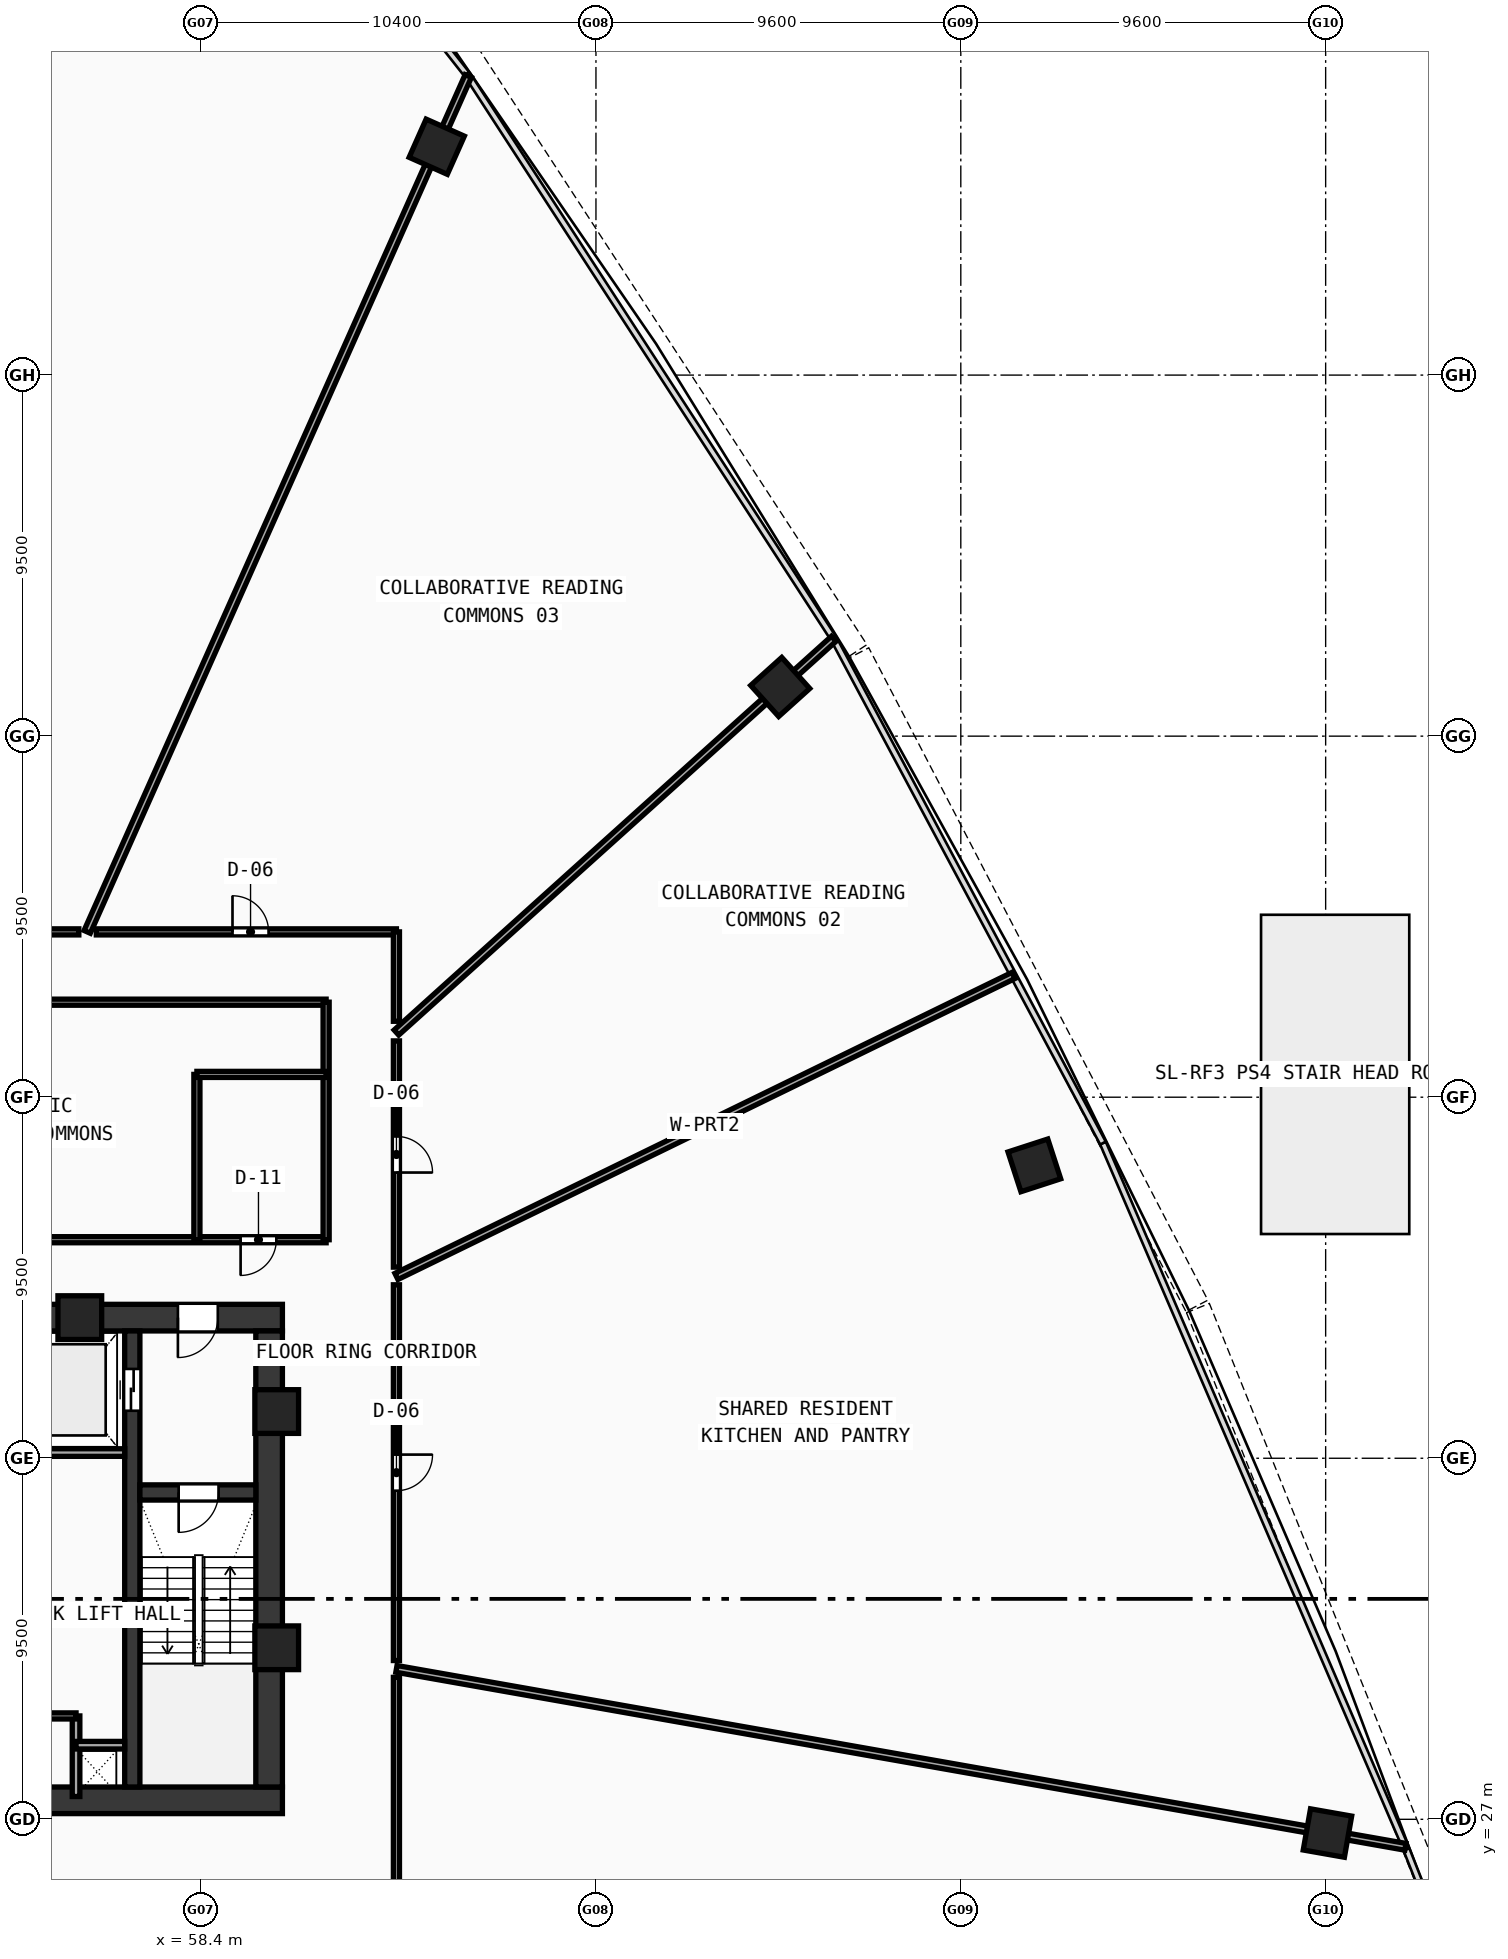
"""IFC4 building model, lengths in metres.
Left out: names, types, materials, properties, quantities, classifications, styles, units other than length and angle.
Written with IfcOpenShell. Run it as: python <this file> out.ifc"""

import sys

from ifc_helpers import new_model, si_unit, direction, frame, frame_2d, origin, origin_with_axes, origin_2d, place, context, subcontext, project, spatial, rectangle, hollow_rectangle, extrude, source, transform, mapped, element, fill, save


model = new_model("IFC4")
c1 = context("Model", 3, precision=1e-05, world=origin(), true_north=direction((0.0, 1.0)))
c2 = subcontext(c1, "Body", "Model", "MODEL_VIEW")
j1 = project(units=[si_unit("LENGTHUNIT", "METRE"), si_unit("PLANEANGLEUNIT", "RADIAN")], contexts=[c1])
p1 = place(None, origin())
s1 = spatial("IfcSite", under=j1, at=p1, CompositionType="ELEMENT")
p2 = place(p1, origin())
s2 = spatial("IfcBuilding", under=s1, at=p2, CompositionType="ELEMENT")
p3 = place(p2, frame((0.0, 0.0, 30.4)))
s3 = spatial("IfcBuildingStorey", under=s2, at=p3, CompositionType="ELEMENT", Elevation=30.4)
p4 = place(p3, frame((35.45, 27.5, 0.0), z_axis=(0.0, 0.0, 1.0), x_axis=(1.0, 0.0, 0.0)))
e1 = element("IfcWall", 1, at=p4, inside=s3, PredefinedType="SHEAR", context=c2, shape_type="SweptSolid", body=[
    extrude(rectangle(XDim=25.1, YDim=0.7, at=frame_2d((12.55, 0.0))), origin(), (0.0, 0.0, 1.0), 3.37),
])
p5 = place(p3, frame((49.2, 40.2, 0.0), z_axis=(0.0, 0.0, 1.0), x_axis=(1.0, 0.0, 0.0)))
e2 = element("IfcWall", 2, at=p5, inside=s3, PredefinedType="SHEAR", context=c2, shape_type="SweptSolid", body=[
    extrude(rectangle(XDim=11.35, YDim=0.7, at=frame_2d((5.675, 0.0))), origin(), (0.0, 0.0, 1.0), 3.37),
])
p6 = place(p5, frame((8.6, 0.0, 0.0)))
e3 = element("IfcOpeningElement", 3, at=p6, cuts=e2, PredefinedType="OPENING", context=c2, shape_type="SweptSolid", body=[
    extrude(rectangle(XDim=1.05, YDim=2.1, at=frame_2d((0.525, 1.05))), frame((0.0, 0.36, 0.0), z_axis=(0.0, -1.0, 0.0), x_axis=(1.0, 0.0, 0.0)), (0.0, 0.0, 1.0), 0.72),
])
p7 = place(p3, frame((60.2, 27.85, 0.0), z_axis=(0.0, 0.0, 1.0), x_axis=(0.0, 1.0, 0.0)))
e4 = element("IfcWall", 4, at=p7, inside=s3, PredefinedType="SHEAR", context=c2, shape_type="SweptSolid", body=[
    extrude(rectangle(XDim=12.0, YDim=0.7, at=frame_2d((6.0, 0.0))), origin(), (0.0, 0.0, 1.0), 3.37),
])
p8 = place(p3, frame((56.6, 27.85, 0.0), z_axis=(0.0, 0.0, 1.0), x_axis=(0.0, 1.0, 0.0)))
e5 = element("IfcWall", 5, at=p8, inside=s3, PredefinedType="SHEAR", context=c2, shape_type="SweptSolid", body=[
    extrude(rectangle(XDim=12.0, YDim=0.4, at=frame_2d((6.0, 0.0))), origin(), (0.0, 0.0, 1.0), 3.37),
])
p9 = place(p8, frame((9.9, 0.0, 0.0)))
e6 = element("IfcOpeningElement", 6, at=p9, cuts=e5, PredefinedType="OPENING", context=c2, shape_type="SweptSolid", body=[
    extrude(rectangle(XDim=1.1, YDim=2.1, at=frame_2d((0.55, 1.05))), frame((0.0, 0.21, 0.0), z_axis=(0.0, -1.0, 0.0), x_axis=(1.0, 0.0, 0.0)), (0.0, 0.0, 1.0), 0.42),
])
p10 = place(p3, frame((56.8, 35.6, 0.0), z_axis=(0.0, 0.0, 1.0), x_axis=(1.0, 0.0, 0.0)))
e7 = element("IfcWall", 7, at=p10, inside=s3, PredefinedType="SHEAR", context=c2, shape_type="SweptSolid", body=[
    extrude(rectangle(XDim=3.05, YDim=0.4, at=frame_2d((1.525, 0.0))), origin(), (0.0, 0.0, 1.0), 3.37),
])
p11 = place(p10, frame((1.02, 0.0, 0.0)))
e8 = element("IfcOpeningElement", 8, at=p11, cuts=e7, PredefinedType="OPENING", context=c2, shape_type="SweptSolid", body=[
    extrude(rectangle(XDim=1.05, YDim=2.1, at=frame_2d((0.525, 1.05))), frame((0.0, 0.21, 0.0), z_axis=(0.0, -1.0, 0.0), x_axis=(1.0, 0.0, 0.0)), (0.0, 0.0, 1.0), 0.42),
])
m1 = source(origin(), c2, "Body", "SweptSolid", [
    extrude(hollow_rectangle(XDim=1.15, YDim=1.15, WallThickness=0.048, at=origin_2d()), origin(), (0.0, 0.0, 1.0), 3.63),
])
for number, where, z_axis, x_axis in (
    (9, (60.4, 31.513, -0.26), (0.0, 0.0, 1.0), (1.0, 0.0, 0.0)),
    (10, (60.4, 37.729, -0.26), (0.0, 0.0, 1.0), (1.0, 0.0, 0.0)),
    (11, (55.219, 40.2, -0.26), (0.0, 0.0, 1.0), (1.0, 0.0, 0.0)),
):
    element("IfcColumn", number, at=place(p3, frame(where, z_axis=z_axis, x_axis=x_axis)), inside=s3, PredefinedType="COLUMN", context=c2, shape_type="MappedRepresentation", body=[
        mapped(m1, transform((0.0, 0.0, 0.0), scale=1.0)),
    ])
m2 = source(origin(), c2, "Body", "SweptSolid", [
    extrude(hollow_rectangle(XDim=1.1, YDim=1.1, WallThickness=0.045, at=origin_2d()), origin(), (0.0, 0.0, 1.0), 3.63),
])
for number, where, z_axis, x_axis in (
    (12, (88.048, 26.638, -0.26), (0.0, 0.0, 1.0), (0.174, 0.985, 0.0)),
    (13, (80.335, 44.206, -0.26), (0.0, 0.0, 1.0), (-0.309, 0.951, 0.0)),
    (14, (73.649, 56.794, -0.26), (0.0, 0.0, 1.0), (-0.669, 0.743, 0.0)),
    (15, (64.611, 71.009, -0.26), (0.0, 0.0, 1.0), (-0.914, 0.407, 0.0)),
):
    element("IfcColumn", number, at=place(p3, frame(where, z_axis=z_axis, x_axis=x_axis)), inside=s3, PredefinedType="COLUMN", context=c2, shape_type="MappedRepresentation", body=[
        mapped(m2, transform((0.0, 0.0, 0.0), scale=1.0)),
    ])
p12 = place(p3, frame((53.68, 36.65, 0.0), z_axis=(0.0, 0.0, 1.0), x_axis=(1.0, 0.0, 0.0)))
e16 = element("IfcWall", 16, at=p12, inside=s3, PredefinedType="SOLIDWALL", context=c2, shape_type="SweptSolid", body=[
    extrude(rectangle(XDim=2.72, YDim=0.2, at=frame_2d((1.36, 0.0))), origin(), (0.0, 0.0, 1.0), 3.37),
])
p13 = place(p3, frame((55.12, 27.6, 0.0), z_axis=(0.0, 0.0, 1.0), x_axis=(0.0, 1.0, 0.0)))
e17 = element("IfcWall", 17, at=p13, inside=s3, PredefinedType="SOLIDWALL", context=c2, shape_type="SweptSolid", body=[
    extrude(rectangle(XDim=2.12, YDim=0.2, at=frame_2d((1.06, 0.0))), origin(), (0.0, 0.0, 1.0), 3.37),
])
p14 = place(p3, frame((55.12, 28.95, 0.0), z_axis=(0.0, 0.0, 1.0), x_axis=(1.0, 0.0, 0.0)))
e18 = element("IfcWall", 18, at=p14, inside=s3, PredefinedType="SOLIDWALL", context=c2, shape_type="SweptSolid", body=[
    extrude(rectangle(XDim=1.28, YDim=0.2, at=frame_2d((0.64, 0.0))), origin(), (0.0, 0.0, 1.0), 3.37),
])
p15 = place(p3, frame((51.05, 29.72, 0.0), z_axis=(0.0, 0.0, 1.0), x_axis=(1.0, 0.0, 0.0)))
e19 = element("IfcWall", 19, at=p15, inside=s3, PredefinedType="PARTITIONING", context=c2, shape_type="SweptSolid", body=[
    extrude(rectangle(XDim=4.07, YDim=0.16, at=frame_2d((2.035, 0.0))), origin(), (0.0, 0.0, 1.0), 3.37),
])
p16 = place(p15, frame((0.5, 0.0, 0.0)))
e20 = element("IfcOpeningElement", 20, at=p16, cuts=e19, PredefinedType="OPENING", context=c2, shape_type="SweptSolid", body=[
    extrude(rectangle(XDim=0.9, YDim=2.1, at=frame_2d((0.45, 1.05))), frame((0.0, 0.09, 0.0), z_axis=(0.0, -1.0, 0.0), x_axis=(1.0, 0.0, 0.0)), (0.0, 0.0, 1.0), 0.18),
])
p17 = place(p3, frame((45.92, 42.25, 0.0), z_axis=(0.0, 0.0, 1.0), x_axis=(1.0, 0.0, 0.0)))
e21 = element("IfcWall", 21, at=p17, inside=s3, PredefinedType="PARTITIONING", context=c2, shape_type="SweptSolid", body=[
    extrude(rectangle(XDim=15.78, YDim=0.16, at=frame_2d((7.89, 0.0))), origin(), (0.0, 0.0, 1.0), 2.67),
])
p18 = place(p17, frame((2.1, 0.0, 0.0)))
e22 = element("IfcOpeningElement", 22, at=p18, cuts=e21, PredefinedType="OPENING", context=c2, shape_type="SweptSolid", body=[
    extrude(rectangle(XDim=0.92, YDim=2.1, at=frame_2d((0.46, 1.05))), frame((0.0, 0.09, 0.0), z_axis=(0.0, -1.0, 0.0), x_axis=(1.0, 0.0, 0.0)), (0.0, 0.0, 1.0), 0.18),
])
p19 = place(p17, frame((13.53, 0.0, 0.0)))
e23 = element("IfcOpeningElement", 23, at=p19, cuts=e21, PredefinedType="OPENING", context=c2, shape_type="SweptSolid", body=[
    extrude(rectangle(XDim=0.94, YDim=2.1, at=frame_2d((0.47, 1.05))), frame((0.0, 0.09, 0.0), z_axis=(0.0, -1.0, 0.0), x_axis=(1.0, 0.0, 0.0)), (0.0, 0.0, 1.0), 0.18),
])
p20 = place(p3, frame((45.92, 48.5, 0.0), z_axis=(0.0, 0.0, 1.0), x_axis=(1.0, 0.0, 0.0)))
e24 = element("IfcWall", 24, at=p20, inside=s3, PredefinedType="PARTITIONING", context=c2, shape_type="SweptSolid", body=[
    extrude(rectangle(XDim=15.78, YDim=0.16, at=frame_2d((7.89, 0.0))), origin(), (0.0, 0.0, 1.0), 2.67),
])
p21 = place(p3, frame((61.7, 42.25, 0.0), z_axis=(0.0, 0.0, 1.0), x_axis=(0.0, 1.0, 0.0)))
e25 = element("IfcWall", 25, at=p21, inside=s3, PredefinedType="PARTITIONING", context=c2, shape_type="SweptSolid", body=[
    extrude(rectangle(XDim=6.25, YDim=0.16, at=frame_2d((3.125, 0.0))), origin(), (0.0, 0.0, 1.0), 2.67),
])
p22 = place(p3, frame((58.3, 42.25, 0.0), z_axis=(0.0, 0.0, 1.0), x_axis=(0.0, 1.0, 0.0)))
e26 = element("IfcWall", 26, at=p22, inside=s3, PredefinedType="PARTITIONING", context=c2, shape_type="SweptSolid", body=[
    extrude(rectangle(XDim=4.35, YDim=0.16, at=frame_2d((2.175, 0.0))), origin(), (0.0, 0.0, 1.0), 2.67),
])
p23 = place(p3, frame((58.3, 46.6, 0.0), z_axis=(0.0, 0.0, 1.0), x_axis=(1.0, 0.0, 0.0)))
e27 = element("IfcWall", 27, at=p23, inside=s3, PredefinedType="PARTITIONING", context=c2, shape_type="SweptSolid", body=[
    extrude(rectangle(XDim=3.4, YDim=0.16, at=frame_2d((1.7, 0.0))), origin(), (0.0, 0.0, 1.0), 2.97),
])
p24 = place(p3, frame((63.55, 41.284, 0.0), z_axis=(0.0, 0.0, 1.0), x_axis=(0.898792344086, 0.438374636825, 0.0)))
e28 = element("IfcWall", 28, at=p24, inside=s3, PredefinedType="PARTITIONING", context=c2, shape_type="SweptSolid", body=[
    extrude(rectangle(XDim=18.064, YDim=0.18, at=frame_2d((9.032, 0.0))), origin(), (0.0, 0.0, 1.0), 2.67),
])
p25 = place(p3, frame((63.55, 47.701, 0.0), z_axis=(0.0, 0.0, 1.0), x_axis=(0.743145159556, 0.669130235326, 0.0)))
e29 = element("IfcWall", 29, at=p25, inside=s3, PredefinedType="PARTITIONING", context=c2, shape_type="SweptSolid", body=[
    extrude(rectangle(XDim=15.483, YDim=0.18, at=frame_2d((7.742, 0.0))), origin(), (0.0, 0.0, 1.0), 2.67),
])
p26 = place(p3, frame((55.413, 50.35, 0.0), z_axis=(0.0, 0.0, 1.0), x_axis=(0.406741199867, 0.913543428815, 0.0)))
e30 = element("IfcWall", 30, at=p26, inside=s3, PredefinedType="PARTITIONING", context=c2, shape_type="SweptSolid", body=[
    extrude(rectangle(XDim=24.65, YDim=0.18, at=frame_2d((12.325, 0.0))), origin(), (0.0, 0.0, 1.0), 2.67),
])
p27 = place(p3, frame((63.55, 30.958, 0.0), z_axis=(0.0, 0.0, 1.0), x_axis=(0.984807983054, -0.17364687303, 0.0)))
e31 = element("IfcWall", 31, at=p27, inside=s3, PredefinedType="PARTITIONING", context=c2, shape_type="SweptSolid", body=[
    extrude(rectangle(XDim=26.958, YDim=0.18, at=frame_2d((13.479, 0.0))), origin(), (0.0, 0.0, 1.0), 2.67),
])
p28 = place(p3, frame((45.85, 50.35, 0.0), z_axis=(0.0, 0.0, 1.0), x_axis=(1.0, 0.0, 0.0)))
e32 = element("IfcWall", 32, at=p28, inside=s3, PredefinedType="PARTITIONING", context=c2, shape_type="SweptSolid", body=[
    extrude(rectangle(XDim=9.343, YDim=0.16, at=frame_2d((4.672, 0.0))), origin(), (0.0, 0.0, 1.0), 2.67),
])
p29 = place(p28, frame((4.076, 0.0, 0.0)))
e33 = element("IfcOpeningElement", 33, at=p29, cuts=e32, PredefinedType="OPENING", context=c2, shape_type="SweptSolid", body=[
    extrude(rectangle(XDim=0.95, YDim=2.1, at=frame_2d((0.475, 1.05))), frame((0.0, 0.09, 0.0), z_axis=(0.0, -1.0, 0.0), x_axis=(1.0, 0.0, 0.0)), (0.0, 0.0, 1.0), 0.18),
])
p30 = place(p3, frame((55.654, 50.35, 0.0), z_axis=(0.0, 0.0, 1.0), x_axis=(1.0, 0.0, 0.0)))
e34 = element("IfcWall", 34, at=p30, inside=s3, PredefinedType="PARTITIONING", context=c2, shape_type="SweptSolid", body=[
    extrude(rectangle(XDim=7.896, YDim=0.16, at=frame_2d((3.948, 0.0))), origin(), (0.0, 0.0, 1.0), 2.97),
])
p31 = place(p30, frame((3.583, 0.0, 0.0)))
e35 = element("IfcOpeningElement", 35, at=p31, cuts=e34, PredefinedType="OPENING", context=c2, shape_type="SweptSolid", body=[
    extrude(rectangle(XDim=0.95, YDim=2.1, at=frame_2d((0.475, 1.05))), frame((0.0, 0.09, 0.0), z_axis=(0.0, -1.0, 0.0), x_axis=(1.0, 0.0, 0.0)), (0.0, 0.0, 1.0), 0.18),
])
p32 = place(p3, frame((63.55, 50.35, 0.0), z_axis=(0.0, 0.0, 1.0), x_axis=(0.0, -1.0, 0.0)))
e36 = element("IfcWall", 36, at=p32, inside=s3, PredefinedType="PARTITIONING", context=c2, shape_type="SweptSolid", body=[
    extrude(rectangle(XDim=2.353, YDim=0.16, at=frame_2d((1.176, 0.0))), origin(), (0.0, 0.0, 1.0), 3.37),
])
p33 = place(p3, frame((63.55, 47.482, 0.0), z_axis=(0.0, 0.0, 1.0), x_axis=(0.0, -1.0, 0.0)))
e37 = element("IfcWall", 37, at=p33, inside=s3, PredefinedType="PARTITIONING", context=c2, shape_type="SweptSolid", body=[
    extrude(rectangle(XDim=5.953, YDim=0.16, at=frame_2d((2.976, 0.0))), origin(), (0.0, 0.0, 1.0), 2.67),
])
p34 = place(p33, frame((2.514, 0.0, 0.0)))
e38 = element("IfcOpeningElement", 38, at=p34, cuts=e37, PredefinedType="OPENING", context=c2, shape_type="SweptSolid", body=[
    extrude(rectangle(XDim=0.95, YDim=2.1, at=frame_2d((0.475, 1.05))), frame((0.0, 0.09, 0.0), z_axis=(0.0, -1.0, 0.0), x_axis=(1.0, 0.0, 0.0)), (0.0, 0.0, 1.0), 0.18),
])
p35 = place(p3, frame((63.55, 41.064, 0.0), z_axis=(0.0, 0.0, 1.0), x_axis=(0.0, -1.0, 0.0)))
e39 = element("IfcWall", 39, at=p35, inside=s3, PredefinedType="PARTITIONING", context=c2, shape_type="SweptSolid", body=[
    extrude(rectangle(XDim=9.886, YDim=0.16, at=frame_2d((4.943, 0.0))), origin(), (0.0, 0.0, 1.0), 2.67),
])
p36 = place(p35, frame((4.468, 0.0, 0.0)))
e40 = element("IfcOpeningElement", 40, at=p36, cuts=e39, PredefinedType="OPENING", context=c2, shape_type="SweptSolid", body=[
    extrude(rectangle(XDim=0.95, YDim=2.1, at=frame_2d((0.475, 1.05))), frame((0.0, 0.09, 0.0), z_axis=(0.0, -1.0, 0.0), x_axis=(1.0, 0.0, 0.0)), (0.0, 0.0, 1.0), 0.18),
])
p37 = place(p3, frame((63.55, 30.735, 0.0), z_axis=(0.0, 0.0, 1.0), x_axis=(0.0, -1.0, 0.0)))
e41 = element("IfcWall", 41, at=p37, inside=s3, PredefinedType="PARTITIONING", context=c2, shape_type="SweptSolid", body=[
    extrude(rectangle(XDim=5.935, YDim=0.16, at=frame_2d((2.967, 0.0))), origin(), (0.0, 0.0, 1.0), 2.97),
])
m3 = source(origin(), c2, "Body", "SweptSolid", [
    extrude(rectangle(XDim=1.05, YDim=2.1, at=frame_2d((0.525, 1.05))), frame((0.0, 0.025, 0.0), z_axis=(0.0, -1.0, 0.0), x_axis=(1.0, 0.0, 0.0)), (0.0, 0.0, 1.0), 0.05),
])
p38 = place(p11, frame((1.05, 0.0, 0.0), z_axis=(0.0, 0.0, 1.0), x_axis=(-1.0, 0.0, 0.0)))
e42 = element("IfcDoor", 42, at=p38, inside=s3, OperationType="SINGLE_SWING_RIGHT", PredefinedType="DOOR", context=c2, shape_type="MappedRepresentation", body=[
    mapped(m3, transform((0.0, 0.0, 0.0), scale=1.0)),
])
fill(e8, e42)
p39 = place(p6, frame((1.05, 0.0, 0.0), z_axis=(0.0, 0.0, 1.0), x_axis=(-1.0, 0.0, 0.0)))
e43 = element("IfcDoor", 43, at=p39, inside=s3, OperationType="SINGLE_SWING_RIGHT", PredefinedType="DOOR", context=c2, shape_type="MappedRepresentation", body=[
    mapped(m3, transform((0.0, 0.0, 0.0), scale=1.0)),
])
fill(e3, e43)
m4 = source(origin(), c2, "Body", "SweptSolid", [
    extrude(rectangle(XDim=1.1, YDim=2.1, at=frame_2d((0.55, 1.05))), frame((0.0, 0.025, 0.0), z_axis=(0.0, -1.0, 0.0), x_axis=(1.0, 0.0, 0.0)), (0.0, 0.0, 1.0), 0.05),
])
p40 = place(p9, origin_with_axes())
e44 = element("IfcDoor", 44, at=p40, inside=s3, OperationType="DOUBLE_DOOR_SLIDING", PredefinedType="DOOR", context=c2, shape_type="MappedRepresentation", body=[
    mapped(m4, transform((0.0, 0.0, 0.0), scale=1.0)),
])
fill(e6, e44)
m5 = source(origin(), c2, "Body", "SweptSolid", [
    extrude(rectangle(XDim=0.94, YDim=2.1, at=frame_2d((0.47, 1.05))), frame((0.0, 0.025, 0.0), z_axis=(0.0, -1.0, 0.0), x_axis=(1.0, 0.0, 0.0)), (0.0, 0.0, 1.0), 0.05),
])
p41 = place(p19, frame((0.94, 0.0, 0.0), z_axis=(0.0, 0.0, 1.0), x_axis=(-1.0, 0.0, 0.0)))
e45 = element("IfcDoor", 45, at=p41, inside=s3, OperationType="SINGLE_SWING_RIGHT", PredefinedType="DOOR", context=c2, shape_type="MappedRepresentation", body=[
    mapped(m5, transform((0.0, 0.0, 0.0), scale=1.0)),
])
fill(e23, e45)
m6 = source(origin(), c2, "Body", "SweptSolid", [
    extrude(rectangle(XDim=0.95, YDim=2.1, at=frame_2d((0.475, 1.05))), frame((0.0, 0.025, 0.0), z_axis=(0.0, -1.0, 0.0), x_axis=(1.0, 0.0, 0.0)), (0.0, 0.0, 1.0), 0.05),
])
p42 = place(p36, origin_with_axes())
e46 = element("IfcDoor", 46, at=p42, inside=s3, OperationType="SINGLE_SWING_LEFT", PredefinedType="DOOR", context=c2, shape_type="MappedRepresentation", body=[
    mapped(m6, transform((0.0, 0.0, 0.0), scale=1.0)),
])
fill(e40, e46)
p43 = place(p34, origin_with_axes())
e47 = element("IfcDoor", 47, at=p43, inside=s3, OperationType="SINGLE_SWING_RIGHT", PredefinedType="DOOR", context=c2, shape_type="MappedRepresentation", body=[
    mapped(m6, transform((0.0, 0.0, 0.0), scale=1.0)),
])
fill(e38, e47)
p44 = place(p31, origin_with_axes())
e48 = element("IfcDoor", 48, at=p44, inside=s3, OperationType="SINGLE_SWING_LEFT", PredefinedType="DOOR", context=c2, shape_type="MappedRepresentation", body=[
    mapped(m6, transform((0.0, 0.0, 0.0), scale=1.0)),
])
fill(e35, e48)
save(model, sys.argv[1])
